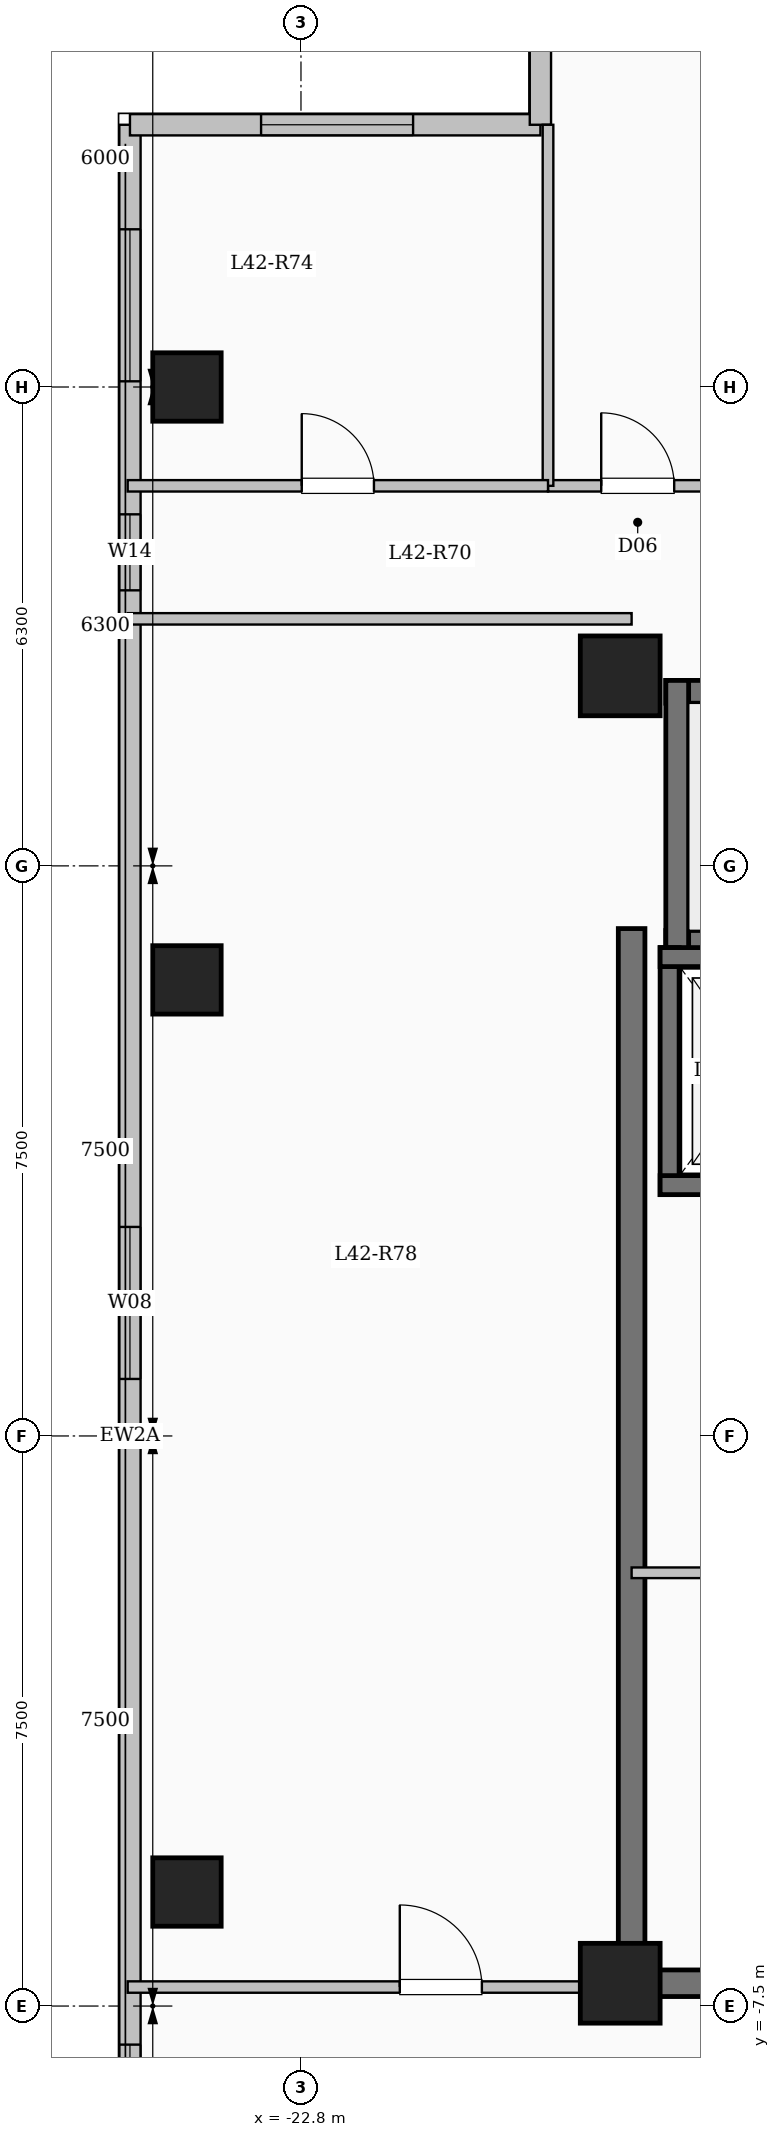
"""IFC4 building model, lengths in metres.
Left out: names, types, materials, properties, quantities, classifications, styles, units other than length and angle.
Written with IfcOpenShell. Run it as: python <this file> out.ifc"""

import sys

from ifc_helpers import new_model, si_unit, direction, frame, frame_2d, origin, origin_2d, place, context, subcontext, project, spatial, rectangle, extrude, element, fill, save


model = new_model("IFC4")
c1 = context("Model", 3, precision=1e-05, world=origin(), true_north=direction((0.0, 1.0)))
c2 = subcontext(c1, "Body", "Model", "MODEL_VIEW")
j1 = project(units=[si_unit("LENGTHUNIT", "METRE"), si_unit("PLANEANGLEUNIT", "RADIAN")], contexts=[c1])
p1 = place(None, origin())
s1 = spatial("IfcSite", under=j1, at=p1, CompositionType="ELEMENT")
p2 = place(p1, origin())
s2 = spatial("IfcBuilding", under=s1, at=p2, CompositionType="ELEMENT")
p3 = place(p2, frame((0.0, 0.0, 156.05)))
s3 = spatial("IfcBuildingStorey", under=s2, at=p3, CompositionType="ELEMENT", Elevation=156.05)
for number, where, z_axis, x_axis in (
    (1, (-18.6, -7.2, 0.0), (0.0, 0.0, 1.0), (1.0, 0.0, 0.0)),
    (2, (-18.6, 10.0, 0.0), (0.0, 0.0, 1.0), (1.0, 0.0, 0.0)),
):
    element("IfcColumn", number, at=place(p3, frame(where, z_axis=z_axis, x_axis=x_axis)), inside=s3, PredefinedType="COLUMN", context=c2, shape_type="SweptSolid", body=[
        extrude(rectangle(XDim=1.05, YDim=1.05, at=origin_2d()), origin(), (0.0, 0.0, 1.0), 3.35),
    ])
for number, where, z_axis, x_axis in (
    (3, (-24.3, -6.0, 0.0), (0.0, 0.0, 1.0), (1.0, 0.0, 0.0)),
    (4, (-24.3, 6.0, 0.0), (0.0, 0.0, 1.0), (1.0, 0.0, 0.0)),
    (5, (-24.3, 13.8, 0.0), (0.0, 0.0, 1.0), (1.0, 0.0, 0.0)),
):
    element("IfcColumn", number, at=place(p3, frame(where, z_axis=z_axis, x_axis=x_axis)), inside=s3, PredefinedType="COLUMN", context=c2, shape_type="SweptSolid", body=[
        extrude(rectangle(XDim=0.9, YDim=0.9, at=origin_2d()), origin(), (0.0, 0.0, 1.0), 3.35),
    ])
p4 = place(p3, frame((-25.05, -17.25, 0.0), z_axis=(0.0, 0.0, 1.0), x_axis=(0.0, 1.0, 0.0)))
e6 = element("IfcWall", 6, at=p4, inside=s3, PredefinedType="SOLIDWALL", context=c2, shape_type="SweptSolid", body=[
    extrude(rectangle(XDim=34.5, YDim=0.28, at=frame_2d((17.25, 0.0))), origin(), (0.0, 0.0, 1.0), 3.1),
])
p5 = place(p4, frame((2.35, 0.0, 0.9)))
e7 = element("IfcOpeningElement", 7, at=p5, cuts=e6, PredefinedType="OPENING", context=c2, shape_type="SweptSolid", body=[
    extrude(rectangle(XDim=2.2, YDim=1.75, at=frame_2d((1.1, 0.875))), frame((0.0, 0.15, 0.0), z_axis=(0.0, -1.0, 0.0), x_axis=(1.0, 0.0, 0.0)), (0.0, 0.0, 1.0), 0.3),
])
p6 = place(p4, frame((7.742, 0.0, 0.9)))
e8 = element("IfcOpeningElement", 8, at=p6, cuts=e6, PredefinedType="OPENING", context=c2, shape_type="SweptSolid", body=[
    extrude(rectangle(XDim=1.5, YDim=1.65, at=frame_2d((0.75, 0.825))), frame((0.0, 0.15, 0.0), z_axis=(0.0, -1.0, 0.0), x_axis=(1.0, 0.0, 0.0)), (0.0, 0.0, 1.0), 0.3),
])
p7 = place(p4, frame((18.0, 0.0, 0.9)))
e9 = element("IfcOpeningElement", 9, at=p7, cuts=e6, PredefinedType="OPENING", context=c2, shape_type="SweptSolid", body=[
    extrude(rectangle(XDim=2.0, YDim=1.7, at=frame_2d((1.0, 0.85))), frame((0.0, 0.15, 0.0), z_axis=(0.0, -1.0, 0.0), x_axis=(1.0, 0.0, 0.0)), (0.0, 0.0, 1.0), 0.3),
])
p8 = place(p4, frame((28.375, 0.0, 0.95)))
e10 = element("IfcOpeningElement", 10, at=p8, cuts=e6, PredefinedType="OPENING", context=c2, shape_type="SweptSolid", body=[
    extrude(rectangle(XDim=1.0, YDim=1.5, at=frame_2d((0.5, 0.75))), frame((0.0, 0.15, 0.0), z_axis=(0.0, -1.0, 0.0), x_axis=(1.0, 0.0, 0.0)), (0.0, 0.0, 1.0), 0.3),
])
p9 = place(p4, frame((31.125, 0.0, 0.9)))
e11 = element("IfcOpeningElement", 11, at=p9, cuts=e6, PredefinedType="OPENING", context=c2, shape_type="SweptSolid", body=[
    extrude(rectangle(XDim=2.0, YDim=1.7, at=frame_2d((1.0, 0.85))), frame((0.0, 0.15, 0.0), z_axis=(0.0, -1.0, 0.0), x_axis=(1.0, 0.0, 0.0)), (0.0, 0.0, 1.0), 0.3),
])
p10 = place(p3, frame((-25.05, 17.25, 0.0), z_axis=(0.0, 0.0, 1.0), x_axis=(1.0, 0.0, 0.0)))
e12 = element("IfcWall", 12, at=p10, inside=s3, PredefinedType="SOLIDWALL", context=c2, shape_type="SweptSolid", body=[
    extrude(rectangle(XDim=5.4, YDim=0.28, at=frame_2d((2.7, 0.0))), origin(), (0.0, 0.0, 1.0), 3.1),
])
p11 = place(p10, frame((1.725, 0.0, 0.9)))
e13 = element("IfcOpeningElement", 13, at=p11, cuts=e12, PredefinedType="OPENING", context=c2, shape_type="SweptSolid", body=[
    extrude(rectangle(XDim=2.0, YDim=1.7, at=frame_2d((1.0, 0.85))), frame((0.0, 0.15, 0.0), z_axis=(0.0, -1.0, 0.0), x_axis=(1.0, 0.0, 0.0)), (0.0, 0.0, 1.0), 0.3),
])
p12 = place(p3, frame((-19.65, 17.25, 0.0), z_axis=(0.0, 0.0, 1.0), x_axis=(0.0, 1.0, 0.0)))
e14 = element("IfcWall", 14, at=p12, inside=s3, PredefinedType="SOLIDWALL", context=c2, shape_type="SweptSolid", body=[
    extrude(rectangle(XDim=3.9, YDim=0.28, at=frame_2d((1.95, 0.0))), origin(), (0.0, 0.0, 1.0), 3.1),
])
p13 = place(p12, frame((1.107, 0.0, 0.9)))
e15 = element("IfcOpeningElement", 15, at=p13, cuts=e14, PredefinedType="OPENING", context=c2, shape_type="SweptSolid", body=[
    extrude(rectangle(XDim=1.65, YDim=1.6, at=frame_2d((0.825, 0.8))), frame((0.0, 0.15, 0.0), z_axis=(0.0, -1.0, 0.0), x_axis=(1.0, 0.0, 0.0)), (0.0, 0.0, 1.0), 0.3),
])
p14 = place(p3, frame((-18.0, 9.79, 0.0), z_axis=(0.0, 0.0, 1.0), x_axis=(1.0, 0.0, 0.0)))
e16 = element("IfcWall", 16, at=p14, inside=s3, PredefinedType="SHEAR", context=c2, shape_type="SweptSolid", body=[
    extrude(rectangle(XDim=8.0, YDim=0.3, at=frame_2d((4.0, 0.0))), origin(), (0.0, 0.0, 1.0), 3.35),
])
p15 = place(p3, frame((-18.0, 6.5, 0.0), z_axis=(0.0, 0.0, 1.0), x_axis=(1.0, 0.0, 0.0)))
e17 = element("IfcWall", 17, at=p15, inside=s3, PredefinedType="SHEAR", context=c2, shape_type="SweptSolid", body=[
    extrude(rectangle(XDim=8.0, YDim=0.3, at=frame_2d((4.0, 0.0))), origin(), (0.0, 0.0, 1.0), 3.35),
])
p16 = place(p15, frame((6.45, 0.0, 0.0)))
e18 = element("IfcOpeningElement", 18, at=p16, cuts=e17, PredefinedType="OPENING", context=c2, shape_type="SweptSolid", body=[
    extrude(rectangle(XDim=1.0, YDim=2.15, at=frame_2d((0.5, 1.075))), frame((0.0, 0.16, 0.0), z_axis=(0.0, -1.0, 0.0), x_axis=(1.0, 0.0, 0.0)), (0.0, 0.0, 1.0), 0.32),
])
p17 = place(p3, frame((-17.85, 6.35, 0.0), z_axis=(0.0, 0.0, 1.0), x_axis=(0.0, 1.0, 0.0)))
e19 = element("IfcWall", 19, at=p17, inside=s3, PredefinedType="SHEAR", context=c2, shape_type="SweptSolid", body=[
    extrude(rectangle(XDim=3.59, YDim=0.3, at=frame_2d((1.795, 0.0))), origin(), (0.0, 0.0, 1.0), 3.35),
])
p18 = place(p3, frame((-17.95, 3.175, 0.0), z_axis=(0.0, 0.0, 1.0), x_axis=(0.0, 1.0, 0.0)))
e20 = element("IfcWall", 20, at=p18, inside=s3, PredefinedType="SHEAR", context=c2, shape_type="SweptSolid", body=[
    extrude(rectangle(XDim=3.25, YDim=0.25, at=frame_2d((1.625, 0.0))), origin(), (0.0, 0.0, 1.0), 3.35),
])
for number, where, z_axis, x_axis in (
    (21, (-18.075, 3.3, 0.0), (0.0, 0.0, 1.0), (1.0, 0.0, 0.0)),
    (22, (-18.075, 6.3, 0.0), (0.0, 0.0, 1.0), (1.0, 0.0, 0.0)),
):
    element("IfcWall", number, at=place(p3, frame(where, z_axis=z_axis, x_axis=x_axis)), inside=s3, PredefinedType="SHEAR", context=c2, shape_type="SweptSolid", body=[
        extrude(rectangle(XDim=2.55, YDim=0.25, at=frame_2d((1.275, 0.0))), origin(), (0.0, 0.0, 1.0), 3.35),
    ])
p19 = place(p3, frame((-18.45, -7.375, 0.0), z_axis=(0.0, 0.0, 1.0), x_axis=(0.0, 1.0, 0.0)))
e23 = element("IfcWall", 23, at=p19, inside=s3, PredefinedType="SHEAR", context=c2, shape_type="SweptSolid", body=[
    extrude(rectangle(XDim=14.05, YDim=0.35, at=frame_2d((7.025, 0.0))), origin(), (0.0, 0.0, 1.0), 3.35),
])
p20 = place(p3, frame((-18.625, -7.2, 0.0), z_axis=(0.0, 0.0, 1.0), x_axis=(1.0, 0.0, 0.0)))
e24 = element("IfcWall", 24, at=p20, inside=s3, PredefinedType="SHEAR", context=c2, shape_type="SweptSolid", body=[
    extrude(rectangle(XDim=8.55, YDim=0.35, at=frame_2d((4.275, 0.0))), origin(), (0.0, 0.0, 1.0), 3.35),
])
p21 = place(p3, frame((-18.45, -1.8, 0.0), z_axis=(0.0, 0.0, 1.0), x_axis=(1.0, 0.0, 0.0)))
e25 = element("IfcWall", 25, at=p21, inside=s3, PredefinedType="PARTITIONING", context=c2, shape_type="SweptSolid", body=[
    extrude(rectangle(XDim=3.05, YDim=0.14, at=frame_2d((1.525, 0.0))), origin(), (0.0, 0.0, 1.0), 3.1),
])
p22 = place(p21, frame((1.05, 0.0, 0.0)))
e26 = element("IfcOpeningElement", 26, at=p22, cuts=e25, PredefinedType="OPENING", context=c2, shape_type="SweptSolid", body=[
    extrude(rectangle(XDim=0.9, YDim=2.08, at=frame_2d((0.45, 1.04))), frame((0.0, 0.08, 0.0), z_axis=(0.0, -1.0, 0.0), x_axis=(1.0, 0.0, 0.0)), (0.0, 0.0, 1.0), 0.16),
])
p23 = place(p3, frame((-19.55, 12.5, 0.0), z_axis=(0.0, 0.0, 1.0), x_axis=(1.0, 0.0, 0.0)))
e27 = element("IfcWall", 27, at=p23, inside=s3, PredefinedType="PARTITIONING", context=c2, shape_type="SweptSolid", body=[
    extrude(rectangle(XDim=15.7, YDim=0.15, at=frame_2d((7.85, 0.0))), origin(), (0.0, 0.0, 1.0), 3.1),
])
p24 = place(p23, frame((0.7, 0.0, 0.0)))
e28 = element("IfcOpeningElement", 28, at=p24, cuts=e27, PredefinedType="OPENING", context=c2, shape_type="SweptSolid", body=[
    extrude(rectangle(XDim=0.96, YDim=2.15, at=frame_2d((0.48, 1.075))), frame((0.0, 0.085, 0.0), z_axis=(0.0, -1.0, 0.0), x_axis=(1.0, 0.0, 0.0)), (0.0, 0.0, 1.0), 0.17),
])
p25 = place(p23, frame((10.348, 0.0, 0.0)))
e29 = element("IfcOpeningElement", 29, at=p25, cuts=e27, PredefinedType="OPENING", context=c2, shape_type="SweptSolid", body=[
    extrude(rectangle(XDim=0.96, YDim=2.15, at=frame_2d((0.48, 1.075))), frame((0.0, 0.085, 0.0), z_axis=(0.0, -1.0, 0.0), x_axis=(1.0, 0.0, 0.0)), (0.0, 0.0, 1.0), 0.17),
])
p26 = place(p3, frame((-25.08, -7.25, 0.0), z_axis=(0.0, 0.0, 1.0), x_axis=(1.0, 0.0, 0.0)))
e30 = element("IfcWall", 30, at=p26, inside=s3, PredefinedType="PARTITIONING", context=c2, shape_type="SweptSolid", body=[
    extrude(rectangle(XDim=6.63, YDim=0.15, at=frame_2d((3.315, 0.0))), origin(), (0.0, 0.0, 1.0), 3.1),
])
p27 = place(p26, frame((3.58, 0.0, 0.0)))
e31 = element("IfcOpeningElement", 31, at=p27, cuts=e30, PredefinedType="OPENING", context=c2, shape_type="SweptSolid", body=[
    extrude(rectangle(XDim=1.08, YDim=2.15, at=frame_2d((0.54, 1.075))), frame((0.0, 0.085, 0.0), z_axis=(0.0, -1.0, 0.0), x_axis=(1.0, 0.0, 0.0)), (0.0, 0.0, 1.0), 0.17),
])
p28 = place(p3, frame((-25.08, 10.75, 0.0), z_axis=(0.0, 0.0, 1.0), x_axis=(1.0, 0.0, 0.0)))
e32 = element("IfcWall", 32, at=p28, inside=s3, PredefinedType="PARTITIONING", context=c2, shape_type="SweptSolid", body=[
    extrude(rectangle(XDim=6.63, YDim=0.15, at=frame_2d((3.315, 0.0))), origin(), (0.0, 0.0, 1.0), 3.1),
])
p29 = place(p3, frame((-19.55, 12.5, 0.0), z_axis=(0.0, 0.0, 1.0), x_axis=(0.0, 1.0, 0.0)))
e33 = element("IfcWall", 33, at=p29, inside=s3, PredefinedType="PARTITIONING", context=c2, shape_type="SweptSolid", body=[
    extrude(rectangle(XDim=4.75, YDim=0.14, at=frame_2d((2.375, 0.0))), origin(), (0.0, 0.0, 1.0), 3.1),
])
p30 = place(p3, frame((-25.08, 12.5, 0.0), z_axis=(0.0, 0.0, 1.0), x_axis=(1.0, 0.0, 0.0)))
e34 = element("IfcWall", 34, at=p30, inside=s3, PredefinedType="PARTITIONING", context=c2, shape_type="SweptSolid", body=[
    extrude(rectangle(XDim=5.53, YDim=0.15, at=frame_2d((2.765, 0.0))), origin(), (0.0, 0.0, 1.0), 3.1),
])
p31 = place(p30, frame((2.29, 0.0, 0.0)))
e35 = element("IfcOpeningElement", 35, at=p31, cuts=e34, PredefinedType="OPENING", context=c2, shape_type="SweptSolid", body=[
    extrude(rectangle(XDim=0.95, YDim=2.15, at=frame_2d((0.475, 1.075))), frame((0.0, 0.085, 0.0), z_axis=(0.0, -1.0, 0.0), x_axis=(1.0, 0.0, 0.0)), (0.0, 0.0, 1.0), 0.17),
])
p32 = place(p6, origin())
e36 = element("IfcWindow", 36, at=p32, inside=s3, PartitioningType="SINGLE_PANEL", PredefinedType="WINDOW", context=c2, shape_type="SweptSolid", body=[
    extrude(rectangle(XDim=1.5, YDim=1.65, at=frame_2d((0.75, 0.825))), frame((0.0, 0.03, 0.0), z_axis=(0.0, -1.0, 0.0), x_axis=(1.0, 0.0, 0.0)), (0.0, 0.0, 1.0), 0.06),
])
fill(e8, e36)
p33 = place(p7, origin())
e37 = element("IfcWindow", 37, at=p33, inside=s3, PartitioningType="SINGLE_PANEL", PredefinedType="WINDOW", context=c2, shape_type="SweptSolid", body=[
    extrude(rectangle(XDim=2.0, YDim=1.7, at=frame_2d((1.0, 0.85))), frame((0.0, 0.03, 0.0), z_axis=(0.0, -1.0, 0.0), x_axis=(1.0, 0.0, 0.0)), (0.0, 0.0, 1.0), 0.06),
])
fill(e9, e37)
p34 = place(p8, origin())
e38 = element("IfcWindow", 38, at=p34, inside=s3, PartitioningType="SINGLE_PANEL", PredefinedType="WINDOW", context=c2, shape_type="SweptSolid", body=[
    extrude(rectangle(XDim=1.0, YDim=1.5, at=frame_2d((0.5, 0.75))), frame((0.0, 0.03, 0.0), z_axis=(0.0, -1.0, 0.0), x_axis=(1.0, 0.0, 0.0)), (0.0, 0.0, 1.0), 0.06),
])
fill(e10, e38)
p35 = place(p9, origin())
e39 = element("IfcWindow", 39, at=p35, inside=s3, PartitioningType="SINGLE_PANEL", PredefinedType="WINDOW", context=c2, shape_type="SweptSolid", body=[
    extrude(rectangle(XDim=2.0, YDim=1.7, at=frame_2d((1.0, 0.85))), frame((0.0, 0.03, 0.0), z_axis=(0.0, -1.0, 0.0), x_axis=(1.0, 0.0, 0.0)), (0.0, 0.0, 1.0), 0.06),
])
fill(e11, e39)
p36 = place(p11, origin())
e40 = element("IfcWindow", 40, at=p36, inside=s3, PartitioningType="SINGLE_PANEL", PredefinedType="WINDOW", context=c2, shape_type="SweptSolid", body=[
    extrude(rectangle(XDim=2.0, YDim=1.7, at=frame_2d((1.0, 0.85))), frame((0.0, 0.03, 0.0), z_axis=(0.0, -1.0, 0.0), x_axis=(1.0, 0.0, 0.0)), (0.0, 0.0, 1.0), 0.06),
])
fill(e13, e40)
p37 = place(p24, origin())
e41 = element("IfcDoor", 41, at=p37, inside=s3, OperationType="SINGLE_SWING_LEFT", PredefinedType="DOOR", context=c2, shape_type="SweptSolid", body=[
    extrude(rectangle(XDim=0.96, YDim=2.15, at=frame_2d((0.48, 1.075))), frame((0.0, 0.025, 0.0), z_axis=(0.0, -1.0, 0.0), x_axis=(1.0, 0.0, 0.0)), (0.0, 0.0, 1.0), 0.05),
])
fill(e28, e41)
p38 = place(p31, origin())
e42 = element("IfcDoor", 42, at=p38, inside=s3, OperationType="SINGLE_SWING_LEFT", PredefinedType="DOOR", context=c2, shape_type="SweptSolid", body=[
    extrude(rectangle(XDim=0.95, YDim=2.15, at=frame_2d((0.475, 1.075))), frame((0.0, 0.025, 0.0), z_axis=(0.0, -1.0, 0.0), x_axis=(1.0, 0.0, 0.0)), (0.0, 0.0, 1.0), 0.05),
])
fill(e35, e42)
p39 = place(p27, origin())
e43 = element("IfcDoor", 43, at=p39, inside=s3, OperationType="SINGLE_SWING_LEFT", PredefinedType="DOOR", context=c2, shape_type="SweptSolid", body=[
    extrude(rectangle(XDim=1.08, YDim=2.15, at=frame_2d((0.54, 1.075))), frame((0.0, 0.025, 0.0), z_axis=(0.0, -1.0, 0.0), x_axis=(1.0, 0.0, 0.0)), (0.0, 0.0, 1.0), 0.05),
])
fill(e31, e43)
save(model, sys.argv[1])
